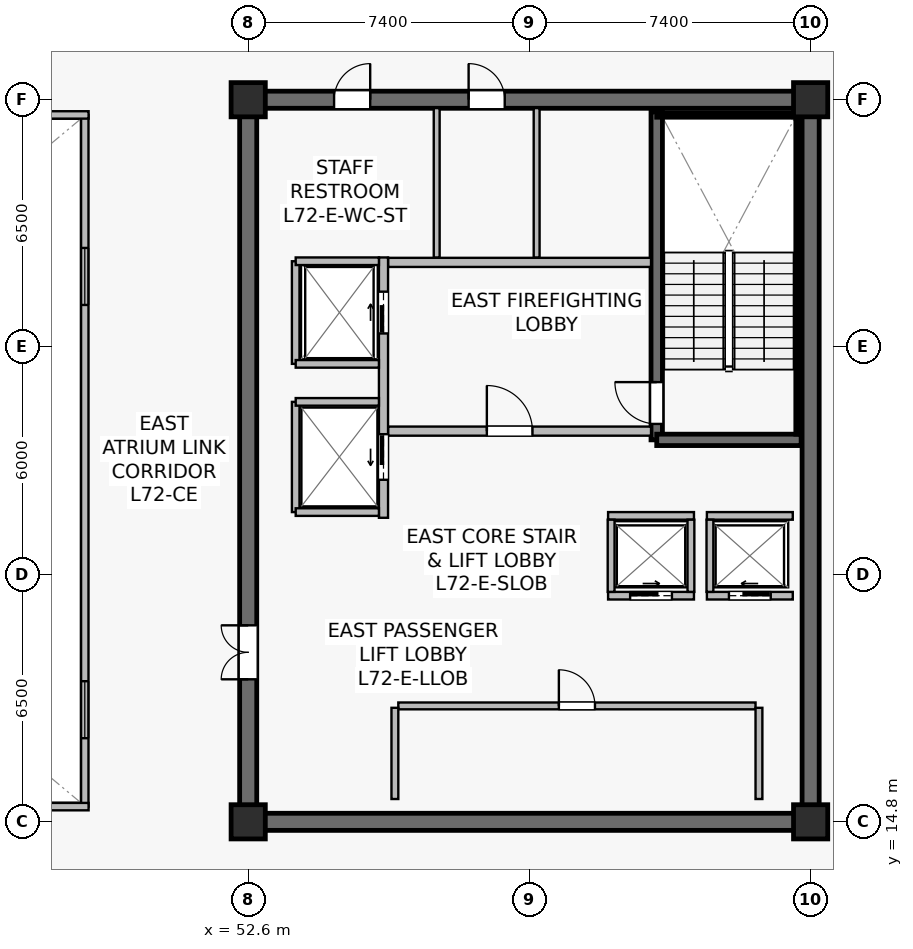
"""IFC4 building model, lengths in metres.
Left out: names, types, materials, properties, quantities, classifications, styles, units other than length and angle.
Written with IfcOpenShell. Run it as: python <this file> out.ifc"""

import sys

from ifc_helpers import new_model, si_unit, direction, frame, frame_2d, origin, origin_2d, place, context, subcontext, project, spatial, rectangle, extrude, source, transform, mapped, element, fill, save


model = new_model("IFC4")
c1 = context("Model", 3, precision=1e-05, world=origin(), true_north=direction((0.0, 1.0)))
c2 = subcontext(c1, "Body", "Model", "MODEL_VIEW")
j1 = project(units=[si_unit("LENGTHUNIT", "METRE"), si_unit("PLANEANGLEUNIT", "RADIAN")], contexts=[c1])
p1 = place(None, origin())
s1 = spatial("IfcSite", under=j1, at=p1, CompositionType="ELEMENT")
p2 = place(p1, origin())
s2 = spatial("IfcBuilding", under=s1, at=p2, CompositionType="ELEMENT")
p3 = place(p2, frame((0.0, 0.0, 301.8)))
s3 = spatial("IfcBuildingStorey", under=s2, at=p3, CompositionType="ELEMENT", Elevation=301.8)
p4 = place(p3, frame((52.375, 14.8, 0.0), z_axis=(0.0, 0.0, 1.0), x_axis=(1.0, 0.0, 0.0)))
e1 = element("IfcWall", 1, at=p4, inside=s3, PredefinedType="SHEAR", context=c2, shape_type="SweptSolid", body=[
    extrude(rectangle(XDim=15.25, YDim=0.45, at=frame_2d((7.625, 0.0))), origin(), (0.0, 0.0, 1.0), 3.9),
])
p5 = place(p3, frame((52.375, 33.8, 0.0), z_axis=(0.0, 0.0, 1.0), x_axis=(1.0, 0.0, 0.0)))
e2 = element("IfcWall", 2, at=p5, inside=s3, PredefinedType="SHEAR", context=c2, shape_type="SweptSolid", body=[
    extrude(rectangle(XDim=15.25, YDim=0.45, at=frame_2d((7.625, 0.0))), origin(), (0.0, 0.0, 1.0), 3.9),
])
p6 = place(p5, frame((6.025, 0.0, 0.0)))
e3 = element("IfcOpeningElement", 3, at=p6, cuts=e2, PredefinedType="OPENING", context=c2, shape_type="SweptSolid", body=[
    extrude(rectangle(XDim=0.95, YDim=2.15, at=frame_2d((0.475, 1.075))), frame((0.0, 0.235, 0.0), z_axis=(0.0, -1.0, 0.0), x_axis=(1.0, 0.0, 0.0)), (0.0, 0.0, 1.0), 0.47),
])
p7 = place(p5, frame((2.485, 0.0, 0.0)))
e4 = element("IfcOpeningElement", 4, at=p7, cuts=e2, PredefinedType="OPENING", context=c2, shape_type="SweptSolid", body=[
    extrude(rectangle(XDim=0.95, YDim=2.15, at=frame_2d((0.475, 1.075))), frame((0.0, 0.235, 0.0), z_axis=(0.0, -1.0, 0.0), x_axis=(1.0, 0.0, 0.0)), (0.0, 0.0, 1.0), 0.47),
])
p8 = place(p3, frame((52.6, 15.025, 0.0), z_axis=(0.0, 0.0, 1.0), x_axis=(0.0, 1.0, 0.0)))
e5 = element("IfcWall", 5, at=p8, inside=s3, PredefinedType="SHEAR", context=c2, shape_type="SweptSolid", body=[
    extrude(rectangle(XDim=18.55, YDim=0.45, at=frame_2d((9.275, 0.0))), origin(), (0.0, 0.0, 1.0), 3.9),
])
p9 = place(p8, frame((3.525, 0.0, 0.0)))
e6 = element("IfcOpeningElement", 6, at=p9, cuts=e5, PredefinedType="OPENING", context=c2, shape_type="SweptSolid", body=[
    extrude(rectangle(XDim=1.42, YDim=2.2, at=frame_2d((0.71, 1.1))), frame((0.0, 0.235, 0.0), z_axis=(0.0, -1.0, 0.0), x_axis=(1.0, 0.0, 0.0)), (0.0, 0.0, 1.0), 0.47),
])
p10 = place(p3, frame((67.4, 15.025, 0.0), z_axis=(0.0, 0.0, 1.0), x_axis=(0.0, 1.0, 0.0)))
e7 = element("IfcWall", 7, at=p10, inside=s3, PredefinedType="SHEAR", context=c2, shape_type="SweptSolid", body=[
    extrude(rectangle(XDim=18.55, YDim=0.45, at=frame_2d((9.275, 0.0))), origin(), (0.0, 0.0, 1.0), 3.9),
])
p11 = place(p3, frame((63.35, 24.85, 0.0), z_axis=(0.0, 0.0, 1.0), x_axis=(0.0, 1.0, 0.0)))
e8 = element("IfcWall", 8, at=p11, inside=s3, PredefinedType="SHEAR", context=c2, shape_type="SweptSolid", body=[
    extrude(rectangle(XDim=8.63, YDim=0.3, at=frame_2d((4.315, 0.0))), origin(), (0.0, 0.0, 1.0), 3.9),
])
p12 = place(p11, frame((0.42, 0.0, 0.0)))
e9 = element("IfcOpeningElement", 9, at=p12, cuts=e8, PredefinedType="OPENING", context=c2, shape_type="SweptSolid", body=[
    extrude(rectangle(XDim=1.1, YDim=2.15, at=frame_2d((0.55, 1.075))), frame((0.0, 0.16, 0.0), z_axis=(0.0, -1.0, 0.0), x_axis=(1.0, 0.0, 0.0)), (0.0, 0.0, 1.0), 0.32),
])
p13 = place(p3, frame((63.35, 24.85, 0.0), z_axis=(0.0, 0.0, 1.0), x_axis=(1.0, 0.0, 0.0)))
e10 = element("IfcWall", 10, at=p13, inside=s3, PredefinedType="SHEAR", context=c2, shape_type="SweptSolid", body=[
    extrude(rectangle(XDim=3.8, YDim=0.3, at=frame_2d((1.9, 0.0))), origin(), (0.0, 0.0, 1.0), 3.9),
])
p14 = place(p3, frame((63.35, 33.4, 0.0), z_axis=(0.0, 0.0, 1.0), x_axis=(1.0, 0.0, 0.0)))
e11 = element("IfcWall", 11, at=p14, inside=s3, PredefinedType="SOLIDWALL", context=c2, shape_type="SweptSolid", body=[
    extrude(rectangle(XDim=3.72, YDim=0.12, at=frame_2d((1.86, 0.0))), origin(), (0.0, 0.0, 1.0), 3.9),
])
p15 = place(p3, frame((67.07, 25.0, 0.0), z_axis=(0.0, 0.0, 1.0), x_axis=(0.0, 1.0, 0.0)))
e12 = element("IfcWall", 12, at=p15, inside=s3, PredefinedType="SOLIDWALL", context=c2, shape_type="SweptSolid", body=[
    extrude(rectangle(XDim=8.32, YDim=0.12, at=frame_2d((4.16, 0.0))), origin(), (0.0, 0.0, 1.0), 3.9),
])
m1 = source(origin(), c2, "Body", "SweptSolid", [
    extrude(rectangle(XDim=0.9, YDim=0.9, at=origin_2d()), origin(), (0.0, 0.0, 1.0), 4.2),
])
for number, where, z_axis, x_axis in (
    (13, (52.6, 14.8, 0.0), (0.0, 0.0, 1.0), (1.0, 0.0, 0.0)),
    (14, (67.4, 14.8, 0.0), (0.0, 0.0, 1.0), (1.0, 0.0, 0.0)),
    (15, (52.6, 33.8, 0.0), (0.0, 0.0, 1.0), (1.0, 0.0, 0.0)),
    (16, (67.4, 33.8, 0.0), (0.0, 0.0, 1.0), (1.0, 0.0, 0.0)),
):
    element("IfcColumn", number, at=place(p3, frame(where, z_axis=z_axis, x_axis=x_axis)), inside=s3, PredefinedType="COLUMN", context=c2, shape_type="MappedRepresentation", body=[
        mapped(m1, transform((0.0, 0.0, 0.0), scale=1.0)),
    ])
p16 = place(p3, frame((56.28, 25.08, 0.0), z_axis=(0.0, 0.0, 1.0), x_axis=(1.0, 0.0, 0.0)))
e17 = element("IfcWall", 17, at=p16, inside=s3, PredefinedType="SOLIDWALL", context=c2, shape_type="SweptSolid", body=[
    extrude(rectangle(XDim=6.92, YDim=0.24, at=frame_2d((3.46, 0.0))), origin(), (0.0, 0.0, 1.0), 3.297),
])
p17 = place(p16, frame((2.6, 0.0, 0.0)))
e18 = element("IfcOpeningElement", 18, at=p17, cuts=e17, PredefinedType="OPENING", context=c2, shape_type="SweptSolid", body=[
    extrude(rectangle(XDim=1.2, YDim=2.16, at=frame_2d((0.6, 1.08))), frame((0.0, 0.13, 0.0), z_axis=(0.0, -1.0, 0.0), x_axis=(1.0, 0.0, 0.0)), (0.0, 0.0, 1.0), 0.26),
])
p18 = place(p3, frame((56.28, 29.52, 0.0), z_axis=(0.0, 0.0, 1.0), x_axis=(1.0, 0.0, 0.0)))
e19 = element("IfcWall", 19, at=p18, inside=s3, PredefinedType="SOLIDWALL", context=c2, shape_type="SweptSolid", body=[
    extrude(rectangle(XDim=6.92, YDim=0.24, at=frame_2d((3.46, 0.0))), origin(), (0.0, 0.0, 1.0), 3.297),
])
p19 = place(p3, frame((56.16, 22.8, 0.0), z_axis=(0.0, 0.0, 1.0), x_axis=(0.0, 1.0, 0.0)))
e20 = element("IfcWall", 20, at=p19, inside=s3, PredefinedType="SOLIDWALL", context=c2, shape_type="SweptSolid", body=[
    extrude(rectangle(XDim=6.85, YDim=0.24, at=frame_2d((3.425, 0.0))), origin(), (0.0, 0.0, 1.0), 3.035),
])
p20 = place(p19, frame((4.85, 0.0, 0.0)))
e21 = element("IfcOpeningElement", 21, at=p20, cuts=e20, PredefinedType="OPENING", context=c2, shape_type="SweptSolid", body=[
    extrude(rectangle(XDim=1.1, YDim=2.22, at=frame_2d((0.55, 1.11))), frame((0.0, 0.13, 0.0), z_axis=(0.0, -1.0, 0.0), x_axis=(1.0, 0.0, 0.0)), (0.0, 0.0, 1.0), 0.26),
])
p21 = place(p19, frame((1.0, 0.0, 0.0)))
e22 = element("IfcOpeningElement", 22, at=p21, cuts=e20, PredefinedType="OPENING", context=c2, shape_type="SweptSolid", body=[
    extrude(rectangle(XDim=1.2, YDim=2.22, at=frame_2d((0.6, 1.11))), frame((0.0, 0.13, 0.0), z_axis=(0.0, -1.0, 0.0), x_axis=(1.0, 0.0, 0.0)), (0.0, 0.0, 1.0), 0.26),
])
p22 = place(p3, frame((64.67, 20.75, 0.0), z_axis=(0.0, 0.0, 1.0), x_axis=(1.0, 0.0, 0.0)))
e23 = element("IfcWall", 23, at=p22, inside=s3, PredefinedType="SOLIDWALL", context=c2, shape_type="SweptSolid", body=[
    extrude(rectangle(XDim=2.26, YDim=0.2, at=frame_2d((1.13, 0.0))), origin(), (0.0, 0.0, 1.0), 3.9),
])
p23 = place(p22, frame((0.58, 0.0, 0.0)))
e24 = element("IfcOpeningElement", 24, at=p23, cuts=e23, PredefinedType="OPENING", context=c2, shape_type="SweptSolid", body=[
    extrude(rectangle(XDim=1.1, YDim=2.22, at=frame_2d((0.55, 1.11))), frame((0.0, 0.11, 0.0), z_axis=(0.0, -1.0, 0.0), x_axis=(1.0, 0.0, 0.0)), (0.0, 0.0, 1.0), 0.22),
])
p24 = place(p3, frame((64.67, 22.85, 0.0), z_axis=(0.0, 0.0, 1.0), x_axis=(1.0, 0.0, 0.0)))
e25 = element("IfcWall", 25, at=p24, inside=s3, PredefinedType="SOLIDWALL", context=c2, shape_type="SweptSolid", body=[
    extrude(rectangle(XDim=2.26, YDim=0.2, at=frame_2d((1.13, 0.0))), origin(), (0.0, 0.0, 1.0), 3.9),
])
p25 = place(p3, frame((64.75, 20.85, 0.0), z_axis=(0.0, 0.0, 1.0), x_axis=(0.0, 1.0, 0.0)))
e26 = element("IfcWall", 26, at=p25, inside=s3, PredefinedType="SOLIDWALL", context=c2, shape_type="SweptSolid", body=[
    extrude(rectangle(XDim=1.9, YDim=0.18, at=frame_2d((0.95, 0.0))), origin(), (0.0, 0.0, 1.0), 3.9),
])
p26 = place(p3, frame((62.07, 20.75, 0.0), z_axis=(0.0, 0.0, 1.0), x_axis=(1.0, 0.0, 0.0)))
e27 = element("IfcWall", 27, at=p26, inside=s3, PredefinedType="SOLIDWALL", context=c2, shape_type="SweptSolid", body=[
    extrude(rectangle(XDim=2.26, YDim=0.2, at=frame_2d((1.13, 0.0))), origin(), (0.0, 0.0, 1.0), 3.9),
])
p27 = place(p26, frame((0.58, 0.0, 0.0)))
e28 = element("IfcOpeningElement", 28, at=p27, cuts=e27, PredefinedType="OPENING", context=c2, shape_type="SweptSolid", body=[
    extrude(rectangle(XDim=1.1, YDim=2.22, at=frame_2d((0.55, 1.11))), frame((0.0, 0.11, 0.0), z_axis=(0.0, -1.0, 0.0), x_axis=(1.0, 0.0, 0.0)), (0.0, 0.0, 1.0), 0.22),
])
p28 = place(p3, frame((62.07, 22.85, 0.0), z_axis=(0.0, 0.0, 1.0), x_axis=(1.0, 0.0, 0.0)))
e29 = element("IfcWall", 29, at=p28, inside=s3, PredefinedType="SOLIDWALL", context=c2, shape_type="SweptSolid", body=[
    extrude(rectangle(XDim=2.26, YDim=0.2, at=frame_2d((1.13, 0.0))), origin(), (0.0, 0.0, 1.0), 3.9),
])
for number, where, z_axis, x_axis in (
    (30, (62.15, 20.85, 0.0), (0.0, 0.0, 1.0), (0.0, 1.0, 0.0)),
    (31, (64.25, 20.85, 0.0), (0.0, 0.0, 1.0), (0.0, 1.0, 0.0)),
):
    element("IfcWall", number, at=place(p3, frame(where, z_axis=z_axis, x_axis=x_axis)), inside=s3, PredefinedType="SOLIDWALL", context=c2, shape_type="SweptSolid", body=[
        extrude(rectangle(XDim=1.9, YDim=0.18, at=frame_2d((0.95, 0.0))), origin(), (0.0, 0.0, 1.0), 3.9),
    ])
p29 = place(p3, frame((53.85, 26.85, 0.0), z_axis=(0.0, 0.0, 1.0), x_axis=(0.0, 1.0, 0.0)))
e32 = element("IfcWall", 32, at=p29, inside=s3, PredefinedType="SOLIDWALL", context=c2, shape_type="SweptSolid", body=[
    extrude(rectangle(XDim=2.7, YDim=0.2, at=frame_2d((1.35, 0.0))), origin(), (0.0, 0.0, 1.0), 3.9),
])
p30 = place(p3, frame((53.85, 29.55, 0.0), z_axis=(0.0, 0.0, 1.0), x_axis=(1.0, 0.0, 0.0)))
e33 = element("IfcWall", 33, at=p30, inside=s3, PredefinedType="SOLIDWALL", context=c2, shape_type="SweptSolid", body=[
    extrude(rectangle(XDim=2.19, YDim=0.2, at=frame_2d((1.095, 0.0))), origin(), (0.0, 0.0, 1.0), 3.9),
])
p31 = place(p3, frame((53.85, 26.85, 0.0), z_axis=(0.0, 0.0, 1.0), x_axis=(1.0, 0.0, 0.0)))
e34 = element("IfcWall", 34, at=p31, inside=s3, PredefinedType="SOLIDWALL", context=c2, shape_type="SweptSolid", body=[
    extrude(rectangle(XDim=2.19, YDim=0.2, at=frame_2d((1.095, 0.0))), origin(), (0.0, 0.0, 1.0), 3.297),
])
p32 = place(p3, frame((53.85, 22.95, 0.0), z_axis=(0.0, 0.0, 1.0), x_axis=(0.0, 1.0, 0.0)))
e35 = element("IfcWall", 35, at=p32, inside=s3, PredefinedType="SOLIDWALL", context=c2, shape_type="SweptSolid", body=[
    extrude(rectangle(XDim=2.9, YDim=0.2, at=frame_2d((1.45, 0.0))), origin(), (0.0, 0.0, 1.0), 3.035),
])
for number, where, z_axis, x_axis in (
    (36, (53.85, 25.85, 0.0), (0.0, 0.0, 1.0), (1.0, 0.0, 0.0)),
    (37, (53.85, 22.95, 0.0), (0.0, 0.0, 1.0), (1.0, 0.0, 0.0)),
):
    element("IfcWall", number, at=place(p3, frame(where, z_axis=z_axis, x_axis=x_axis)), inside=s3, PredefinedType="SOLIDWALL", context=c2, shape_type="SweptSolid", body=[
        extrude(rectangle(XDim=2.19, YDim=0.2, at=frame_2d((1.095, 0.0))), origin(), (0.0, 0.0, 1.0), 3.9),
    ])
p33 = place(p3, frame((56.55, 17.85, 0.0), z_axis=(0.0, 0.0, 1.0), x_axis=(1.0, 0.0, 0.0)))
e38 = element("IfcWall", 38, at=p33, inside=s3, PredefinedType="SOLIDWALL", context=c2, shape_type="SweptSolid", body=[
    extrude(rectangle(XDim=9.4, YDim=0.18, at=frame_2d((4.7, 0.0))), origin(), (0.0, 0.0, 1.0), 3.297),
])
p34 = place(p33, frame((4.225, 0.0, 0.0)))
e39 = element("IfcOpeningElement", 39, at=p34, cuts=e38, PredefinedType="OPENING", context=c2, shape_type="SweptSolid", body=[
    extrude(rectangle(XDim=0.95, YDim=2.15, at=frame_2d((0.475, 1.075))), frame((0.0, 0.1, 0.0), z_axis=(0.0, -1.0, 0.0), x_axis=(1.0, 0.0, 0.0)), (0.0, 0.0, 1.0), 0.2),
])
for number, where, z_axis, x_axis in (
    (40, (56.46, 15.4, 0.0), (0.0, 0.0, 1.0), (0.0, 1.0, 0.0)),
    (41, (66.04, 15.4, 0.0), (0.0, 0.0, 1.0), (0.0, 1.0, 0.0)),
):
    element("IfcWall", number, at=place(p3, frame(where, z_axis=z_axis, x_axis=x_axis)), inside=s3, PredefinedType="SOLIDWALL", context=c2, shape_type="SweptSolid", body=[
        extrude(rectangle(XDim=2.4, YDim=0.18, at=frame_2d((1.2, 0.0))), origin(), (0.0, 0.0, 1.0), 3.9),
    ])
p35 = place(p3, frame((60.19, 29.65, 0.0), z_axis=(0.0, 0.0, 1.0), x_axis=(0.0, 1.0, 0.0)))
e42 = element("IfcWall", 42, at=p35, inside=s3, PredefinedType="PLUMBINGWALL", context=c2, shape_type="SweptSolid", body=[
    extrude(rectangle(XDim=3.93, YDim=0.155, at=frame_2d((1.965, 0.0))), origin(), (0.0, 0.0, 1.0), 3.297),
])
p36 = place(p3, frame((57.56, 29.65, 0.0), z_axis=(0.0, 0.0, 1.0), x_axis=(0.0, 1.0, 0.0)))
e43 = element("IfcWall", 43, at=p36, inside=s3, PredefinedType="PLUMBINGWALL", context=c2, shape_type="SweptSolid", body=[
    extrude(rectangle(XDim=3.93, YDim=0.155, at=frame_2d((1.965, 0.0))), origin(), (0.0, 0.0, 1.0), 3.9),
])
p37 = place(p3, frame((48.3, 15.2, 0.0), z_axis=(0.0, 0.0, 1.0), x_axis=(0.0, 1.0, 0.0)))
e44 = element("IfcWall", 44, at=p37, inside=s3, PredefinedType="SOLIDWALL", context=c2, shape_type="SweptSolid", body=[
    extrude(rectangle(XDim=18.2, YDim=0.195, at=frame_2d((9.1, 0.0))), origin(), (0.0, 0.0, 1.0), 3.9),
])
p38 = place(p37, frame((1.8, 0.0, 0.9)))
e45 = element("IfcOpeningElement", 45, at=p38, cuts=e44, PredefinedType="OPENING", context=c2, shape_type="SweptSolid", body=[
    extrude(rectangle(XDim=1.5, YDim=1.4, at=frame_2d((0.75, 0.7))), frame((0.0, 0.107, 0.0), z_axis=(0.0, -1.0, 0.0), x_axis=(1.0, 0.0, 0.0)), (0.0, 0.0, 1.0), 0.215),
])
p39 = place(p37, frame((13.2, 0.0, 0.9)))
e46 = element("IfcOpeningElement", 46, at=p39, cuts=e44, PredefinedType="OPENING", context=c2, shape_type="SweptSolid", body=[
    extrude(rectangle(XDim=1.5, YDim=1.4, at=frame_2d((0.75, 0.7))), frame((0.0, 0.107, 0.0), z_axis=(0.0, -1.0, 0.0), x_axis=(1.0, 0.0, 0.0)), (0.0, 0.0, 1.0), 0.215),
])
for number, where, z_axis, x_axis in (
    (47, (26.4, 15.2, 0.0), (0.0, 0.0, 1.0), (1.0, 0.0, 0.0)),
    (48, (26.4, 33.4, 0.0), (0.0, 0.0, 1.0), (1.0, 0.0, 0.0)),
):
    element("IfcWall", number, at=place(p3, frame(where, z_axis=z_axis, x_axis=x_axis)), inside=s3, PredefinedType="SOLIDWALL", context=c2, shape_type="SweptSolid", body=[
        extrude(rectangle(XDim=22.0, YDim=0.195, at=frame_2d((11.0, 0.0))), origin(), (0.0, 0.0, 1.0), 3.9),
    ])
m2 = source(origin(), c2, "Body", "SweptSolid", [
    extrude(rectangle(XDim=1.5, YDim=1.4, at=frame_2d((0.75, 0.7))), frame((0.0, 0.03, 0.0), z_axis=(0.0, -1.0, 0.0), x_axis=(1.0, 0.0, 0.0)), (0.0, 0.0, 1.0), 0.06),
])
p40 = place(p38, origin())
e49 = element("IfcWindow", 49, at=p40, inside=s3, PartitioningType="SINGLE_PANEL", PredefinedType="WINDOW", context=c2, shape_type="MappedRepresentation", body=[
    mapped(m2, transform((0.0, 0.0, 0.0), scale=1.0)),
])
fill(e45, e49)
p41 = place(p39, origin())
e50 = element("IfcWindow", 50, at=p41, inside=s3, PartitioningType="SINGLE_PANEL", PredefinedType="WINDOW", context=c2, shape_type="MappedRepresentation", body=[
    mapped(m2, transform((0.0, 0.0, 0.0), scale=1.0)),
])
fill(e46, e50)
m3 = source(origin(), c2, "Body", "SweptSolid", [
    extrude(rectangle(XDim=1.1, YDim=2.15, at=frame_2d((0.55, 1.075))), frame((0.0, 0.025, 0.0), z_axis=(0.0, -1.0, 0.0), x_axis=(1.0, 0.0, 0.0)), (0.0, 0.0, 1.0), 0.05),
])
p42 = place(p12, origin())
e51 = element("IfcDoor", 51, at=p42, inside=s3, OperationType="SINGLE_SWING_RIGHT", PredefinedType="DOOR", context=c2, shape_type="MappedRepresentation", body=[
    mapped(m3, transform((0.0, 0.0, 0.0), scale=1.0)),
])
fill(e9, e51)
m4 = source(origin(), c2, "Body", "SweptSolid", [
    extrude(rectangle(XDim=1.2, YDim=2.16, at=frame_2d((0.6, 1.08))), frame((0.0, 0.025, 0.0), z_axis=(0.0, -1.0, 0.0), x_axis=(1.0, 0.0, 0.0)), (0.0, 0.0, 1.0), 0.05),
])
p43 = place(p17, origin())
e52 = element("IfcDoor", 52, at=p43, inside=s3, OperationType="SINGLE_SWING_LEFT", PredefinedType="DOOR", context=c2, shape_type="MappedRepresentation", body=[
    mapped(m4, transform((0.0, 0.0, 0.0), scale=1.0)),
])
fill(e18, e52)
m5 = source(origin(), c2, "Body", "SweptSolid", [
    extrude(rectangle(XDim=1.1, YDim=2.22, at=frame_2d((0.55, 1.11))), frame((0.0, 0.025, 0.0), z_axis=(0.0, -1.0, 0.0), x_axis=(1.0, 0.0, 0.0)), (0.0, 0.0, 1.0), 0.05),
])
p44 = place(p23, origin())
e53 = element("IfcDoor", 53, at=p44, inside=s3, OperationType="SLIDING_TO_LEFT", PredefinedType="USERDEFINED", context=c2, shape_type="MappedRepresentation", body=[
    mapped(m5, transform((0.0, 0.0, 0.0), scale=1.0)),
])
fill(e24, e53)
p45 = place(p27, origin())
e54 = element("IfcDoor", 54, at=p45, inside=s3, OperationType="SLIDING_TO_RIGHT", PredefinedType="USERDEFINED", context=c2, shape_type="MappedRepresentation", body=[
    mapped(m5, transform((0.0, 0.0, 0.0), scale=1.0)),
])
fill(e28, e54)
p46 = place(p20, origin())
e55 = element("IfcDoor", 55, at=p46, inside=s3, OperationType="SLIDING_TO_RIGHT", PredefinedType="USERDEFINED", context=c2, shape_type="MappedRepresentation", body=[
    mapped(m5, transform((0.0, 0.0, 0.0), scale=1.0)),
])
fill(e21, e55)
m6 = source(origin(), c2, "Body", "SweptSolid", [
    extrude(rectangle(XDim=1.2, YDim=2.22, at=frame_2d((0.6, 1.11))), frame((0.0, 0.025, 0.0), z_axis=(0.0, -1.0, 0.0), x_axis=(1.0, 0.0, 0.0)), (0.0, 0.0, 1.0), 0.05),
])
p47 = place(p21, origin())
e56 = element("IfcDoor", 56, at=p47, inside=s3, OperationType="SLIDING_TO_LEFT", PredefinedType="USERDEFINED", context=c2, shape_type="MappedRepresentation", body=[
    mapped(m6, transform((0.0, 0.0, 0.0), scale=1.0)),
])
fill(e22, e56)
m7 = source(origin(), c2, "Body", "SweptSolid", [
    extrude(rectangle(XDim=0.95, YDim=2.15, at=frame_2d((0.475, 1.075))), frame((0.0, 0.025, 0.0), z_axis=(0.0, -1.0, 0.0), x_axis=(1.0, 0.0, 0.0)), (0.0, 0.0, 1.0), 0.05),
])
p48 = place(p34, origin())
e57 = element("IfcDoor", 57, at=p48, inside=s3, OperationType="SINGLE_SWING_LEFT", PredefinedType="DOOR", context=c2, shape_type="MappedRepresentation", body=[
    mapped(m7, transform((0.0, 0.0, 0.0), scale=1.0)),
])
fill(e39, e57)
m8 = source(origin(), c2, "Body", "SweptSolid", [
    extrude(rectangle(XDim=1.42, YDim=2.2, at=frame_2d((0.71, 1.1))), frame((0.0, 0.025, 0.0), z_axis=(0.0, -1.0, 0.0), x_axis=(1.0, 0.0, 0.0)), (0.0, 0.0, 1.0), 0.05),
])
p49 = place(p9, origin())
e58 = element("IfcDoor", 58, at=p49, inside=s3, OperationType="DOUBLE_DOOR_SINGLE_SWING", PredefinedType="DOOR", context=c2, shape_type="MappedRepresentation", body=[
    mapped(m8, transform((0.0, 0.0, 0.0), scale=1.0)),
])
fill(e6, e58)
p50 = place(p6, origin())
e59 = element("IfcDoor", 59, at=p50, inside=s3, OperationType="SINGLE_SWING_LEFT", PredefinedType="DOOR", context=c2, shape_type="MappedRepresentation", body=[
    mapped(m7, transform((0.0, 0.0, 0.0), scale=1.0)),
])
fill(e3, e59)
p51 = place(p7, origin())
e60 = element("IfcDoor", 60, at=p51, inside=s3, OperationType="SINGLE_SWING_RIGHT", PredefinedType="DOOR", context=c2, shape_type="MappedRepresentation", body=[
    mapped(m7, transform((0.0, 0.0, 0.0), scale=1.0)),
])
fill(e4, e60)
save(model, sys.argv[1])
